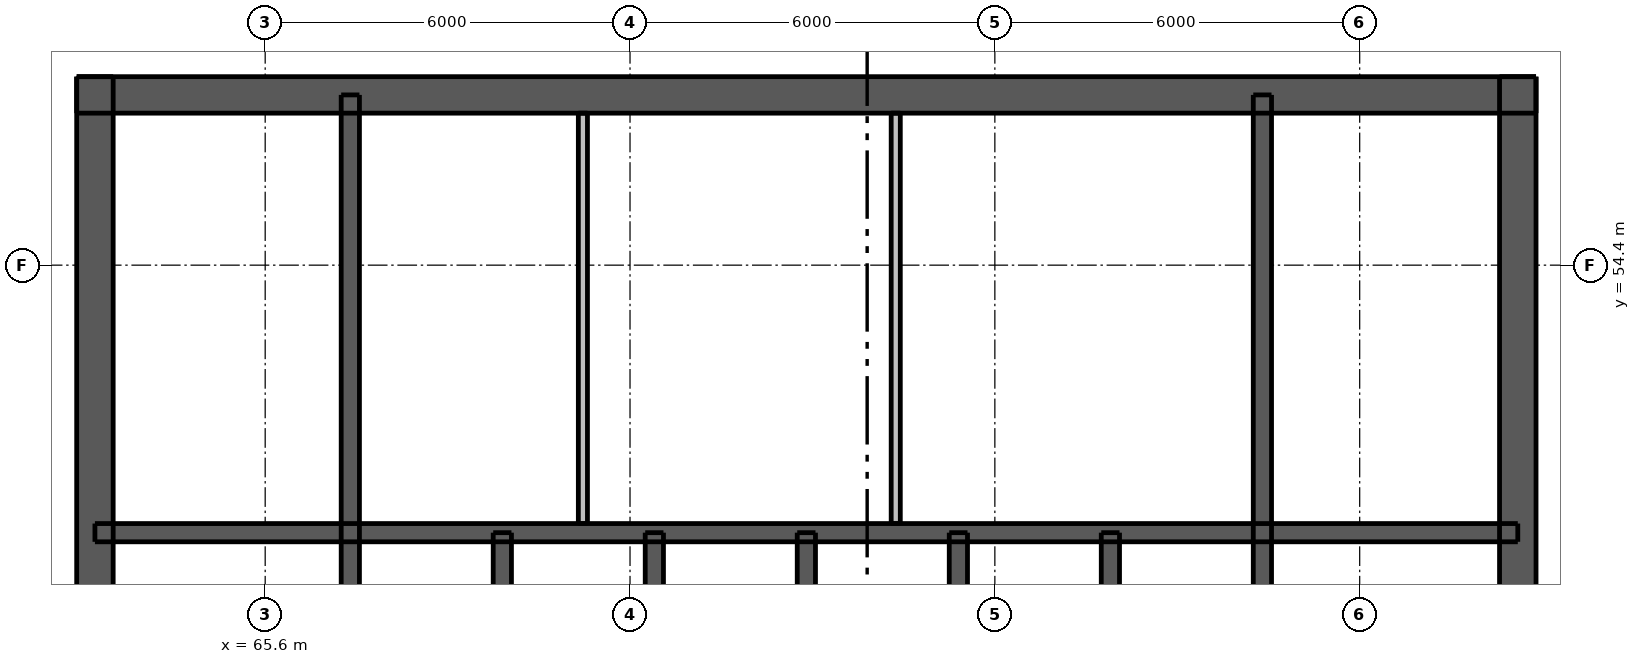
"""IFC4 building model, lengths in metres.
Left out: names, types, materials, properties, quantities, classifications, styles, units other than length and angle.
Written with IfcOpenShell. Run it as: python <this file> out.ifc"""

import sys

from ifc_helpers import new_model, si_unit, direction, frame, frame_2d, origin, place, context, subcontext, project, spatial, rectangle, extrude, element, fill, save


model = new_model("IFC4")
c1 = context("Model", 3, precision=1e-05, world=origin(), true_north=direction((0.0, 1.0)))
c2 = subcontext(c1, "Body", "Model", "MODEL_VIEW")
j1 = project(units=[si_unit("LENGTHUNIT", "METRE"), si_unit("PLANEANGLEUNIT", "RADIAN")], contexts=[c1])
p1 = place(None, origin())
s1 = spatial("IfcSite", under=j1, at=p1, CompositionType="ELEMENT")
p2 = place(p1, origin())
s2 = spatial("IfcBuilding", under=s1, at=p2, CompositionType="ELEMENT")
p3 = place(p2, frame((0.0, 0.0, 216.7)))
s3 = spatial("IfcBuildingStorey", under=s2, at=p3, CompositionType="ELEMENT", Elevation=216.7)
p4 = place(p3, frame((62.5, 57.2, 0.0), z_axis=(0.0, 0.0, 1.0), x_axis=(1.0, 0.0, 0.0)))
e1 = element("IfcWall", 1, at=p4, inside=s3, PredefinedType="SHEAR", context=c2, shape_type="SweptSolid", body=[
    extrude(rectangle(XDim=24.0, YDim=0.6, at=frame_2d((12.0, 0.0))), origin(), (0.0, 0.0, 1.0), 3.05),
])
p5 = place(p4, frame((20.975, 0.0, 0.0)))
e2 = element("IfcOpeningElement", 2, at=p5, cuts=e1, PredefinedType="OPENING", context=c2, shape_type="SweptSolid", body=[
    extrude(rectangle(XDim=1.1, YDim=2.1, at=frame_2d((0.55, 1.05))), frame((0.0, 0.31, 0.0), z_axis=(0.0, -1.0, 0.0), x_axis=(1.0, 0.0, 0.0)), (0.0, 0.0, 1.0), 0.62),
])
p6 = place(p4, frame((1.925, 0.0, 0.0)))
e3 = element("IfcOpeningElement", 3, at=p6, cuts=e1, PredefinedType="OPENING", context=c2, shape_type="SweptSolid", body=[
    extrude(rectangle(XDim=1.1, YDim=2.1, at=frame_2d((0.55, 1.05))), frame((0.0, 0.31, 0.0), z_axis=(0.0, -1.0, 0.0), x_axis=(1.0, 0.0, 0.0)), (0.0, 0.0, 1.0), 0.62),
])
p7 = place(p4, frame((6.038, 0.0, 0.0)))
e4 = element("IfcOpeningElement", 4, at=p7, cuts=e1, PredefinedType="OPENING", context=c2, shape_type="SweptSolid", body=[
    extrude(rectangle(XDim=0.9, YDim=2.1, at=frame_2d((0.45, 1.05))), frame((0.0, 0.31, 0.0), z_axis=(0.0, -1.0, 0.0), x_axis=(1.0, 0.0, 0.0)), (0.0, 0.0, 1.0), 0.62),
])
p8 = place(p4, frame((10.448, 0.0, 0.0)))
e5 = element("IfcOpeningElement", 5, at=p8, cuts=e1, PredefinedType="OPENING", context=c2, shape_type="SweptSolid", body=[
    extrude(rectangle(XDim=0.9, YDim=2.1, at=frame_2d((0.45, 1.05))), frame((0.0, 0.31, 0.0), z_axis=(0.0, -1.0, 0.0), x_axis=(1.0, 0.0, 0.0)), (0.0, 0.0, 1.0), 0.62),
])
p9 = place(p4, frame((15.96, 0.0, 0.0)))
e6 = element("IfcOpeningElement", 6, at=p9, cuts=e1, PredefinedType="OPENING", context=c2, shape_type="SweptSolid", body=[
    extrude(rectangle(XDim=0.9, YDim=2.1, at=frame_2d((0.45, 1.05))), frame((0.0, 0.31, 0.0), z_axis=(0.0, -1.0, 0.0), x_axis=(1.0, 0.0, 0.0)), (0.0, 0.0, 1.0), 0.62),
])
p10 = place(p3, frame((62.8, 33.5, 0.0), z_axis=(0.0, 0.0, 1.0), x_axis=(0.0, 1.0, 0.0)))
e7 = element("IfcWall", 7, at=p10, inside=s3, PredefinedType="SHEAR", context=c2, shape_type="SweptSolid", body=[
    extrude(rectangle(XDim=24.0, YDim=0.6, at=frame_2d((12.0, 0.0))), origin(), (0.0, 0.0, 1.0), 3.05),
])
p11 = place(p10, frame((11.2, 0.0, 0.0)))
e8 = element("IfcOpeningElement", 8, at=p11, cuts=e7, PredefinedType="OPENING", context=c2, shape_type="SweptSolid", body=[
    extrude(rectangle(XDim=1.6, YDim=2.1, at=frame_2d((0.8, 1.05))), frame((0.0, 0.31, 0.0), z_axis=(0.0, -1.0, 0.0), x_axis=(1.0, 0.0, 0.0)), (0.0, 0.0, 1.0), 0.62),
])
p12 = place(p3, frame((86.2, 33.5, 0.0), z_axis=(0.0, 0.0, 1.0), x_axis=(0.0, 1.0, 0.0)))
e9 = element("IfcWall", 9, at=p12, inside=s3, PredefinedType="SHEAR", context=c2, shape_type="SweptSolid", body=[
    extrude(rectangle(XDim=24.0, YDim=0.6, at=frame_2d((12.0, 0.0))), origin(), (0.0, 0.0, 1.0), 3.05),
])
p13 = place(p12, frame((11.2, 0.0, 0.0)))
e10 = element("IfcOpeningElement", 10, at=p13, cuts=e9, PredefinedType="OPENING", context=c2, shape_type="SweptSolid", body=[
    extrude(rectangle(XDim=1.6, YDim=2.1, at=frame_2d((0.8, 1.05))), frame((0.0, 0.31, 0.0), z_axis=(0.0, -1.0, 0.0), x_axis=(1.0, 0.0, 0.0)), (0.0, 0.0, 1.0), 0.62),
])
p14 = place(p3, frame((62.8, 50.0, 0.0), z_axis=(0.0, 0.0, 1.0), x_axis=(1.0, 0.0, 0.0)))
e11 = element("IfcWall", 11, at=p14, inside=s3, PredefinedType="SHEAR", context=c2, shape_type="SweptSolid", body=[
    extrude(rectangle(XDim=23.4, YDim=0.3, at=frame_2d((11.7, 0.0))), origin(), (0.0, 0.0, 1.0), 3.05),
])
for number, where, z_axis, x_axis in (
    (12, (67.0, 47.1, 0.0), (0.0, 0.0, 1.0), (0.0, 1.0, 0.0)),
    (13, (82.0, 47.1, 0.0), (0.0, 0.0, 1.0), (0.0, 1.0, 0.0)),
):
    element("IfcWall", number, at=place(p3, frame(where, z_axis=z_axis, x_axis=x_axis)), inside=s3, PredefinedType="SHEAR", context=c2, shape_type="SweptSolid", body=[
        extrude(rectangle(XDim=10.1, YDim=0.3, at=frame_2d((5.05, 0.0))), origin(), (0.0, 0.0, 1.0), 3.05),
    ])
for number, where, z_axis, x_axis in (
    (14, (69.5, 47.1, 0.0), (0.0, 0.0, 1.0), (0.0, 1.0, 0.0)),
    (15, (72.0, 47.1, 0.0), (0.0, 0.0, 1.0), (0.0, 1.0, 0.0)),
    (16, (74.5, 47.1, 0.0), (0.0, 0.0, 1.0), (0.0, 1.0, 0.0)),
    (17, (77.0, 47.1, 0.0), (0.0, 0.0, 1.0), (0.0, 1.0, 0.0)),
    (18, (79.5, 47.1, 0.0), (0.0, 0.0, 1.0), (0.0, 1.0, 0.0)),
):
    element("IfcWall", number, at=place(p3, frame(where, z_axis=z_axis, x_axis=x_axis)), inside=s3, PredefinedType="SHEAR", context=c2, shape_type="SweptSolid", body=[
        extrude(rectangle(XDim=2.9, YDim=0.3, at=frame_2d((1.45, 0.0))), origin(), (0.0, 0.0, 1.0), 3.05),
    ])
for number, where, z_axis, x_axis in (
    (19, (70.825, 50.15, 0.0), (0.0, 0.0, 1.0), (0.0, 1.0, 0.0)),
    (20, (75.97, 50.15, 0.0), (0.0, 0.0, 1.0), (0.0, 1.0, 0.0)),
):
    element("IfcWall", number, at=place(p3, frame(where, z_axis=z_axis, x_axis=x_axis)), inside=s3, PredefinedType="PLUMBINGWALL", context=c2, shape_type="SweptSolid", body=[
        extrude(rectangle(XDim=6.75, YDim=0.15, at=frame_2d((3.375, 0.0))), origin(), (0.0, 0.0, 1.0), 3.05),
    ])
p15 = place(p5, origin())
e21 = element("IfcDoor", 21, at=p15, inside=s3, OperationType="SINGLE_SWING_RIGHT", PredefinedType="DOOR", context=c2, shape_type="SweptSolid", body=[
    extrude(rectangle(XDim=1.1, YDim=2.1, at=frame_2d((0.55, 1.05))), frame((0.0, -0.237, 0.0), z_axis=(0.0, -1.0, 0.0), x_axis=(1.0, 0.0, 0.0)), (0.0, 0.0, 1.0), 0.05),
])
fill(e2, e21)
p16 = place(p6, origin())
e22 = element("IfcDoor", 22, at=p16, inside=s3, OperationType="SINGLE_SWING_LEFT", PredefinedType="DOOR", context=c2, shape_type="SweptSolid", body=[
    extrude(rectangle(XDim=1.1, YDim=2.1, at=frame_2d((0.55, 1.05))), frame((0.0, -0.237, 0.0), z_axis=(0.0, -1.0, 0.0), x_axis=(1.0, 0.0, 0.0)), (0.0, 0.0, 1.0), 0.05),
])
fill(e3, e22)
p17 = place(p7, origin())
e23 = element("IfcDoor", 23, at=p17, inside=s3, OperationType="SINGLE_SWING_RIGHT", PredefinedType="DOOR", context=c2, shape_type="SweptSolid", body=[
    extrude(rectangle(XDim=0.9, YDim=2.1, at=frame_2d((0.45, 1.05))), frame((0.0, -0.237, 0.0), z_axis=(0.0, -1.0, 0.0), x_axis=(1.0, 0.0, 0.0)), (0.0, 0.0, 1.0), 0.05),
])
fill(e4, e23)
p18 = place(p8, origin())
e24 = element("IfcDoor", 24, at=p18, inside=s3, OperationType="SINGLE_SWING_RIGHT", PredefinedType="DOOR", context=c2, shape_type="SweptSolid", body=[
    extrude(rectangle(XDim=0.9, YDim=2.1, at=frame_2d((0.45, 1.05))), frame((0.0, -0.237, 0.0), z_axis=(0.0, -1.0, 0.0), x_axis=(1.0, 0.0, 0.0)), (0.0, 0.0, 1.0), 0.05),
])
fill(e5, e24)
p19 = place(p9, origin())
e25 = element("IfcDoor", 25, at=p19, inside=s3, OperationType="SINGLE_SWING_RIGHT", PredefinedType="DOOR", context=c2, shape_type="SweptSolid", body=[
    extrude(rectangle(XDim=0.9, YDim=2.1, at=frame_2d((0.45, 1.05))), frame((0.0, -0.237, 0.0), z_axis=(0.0, -1.0, 0.0), x_axis=(1.0, 0.0, 0.0)), (0.0, 0.0, 1.0), 0.05),
])
fill(e6, e25)
save(model, sys.argv[1])
